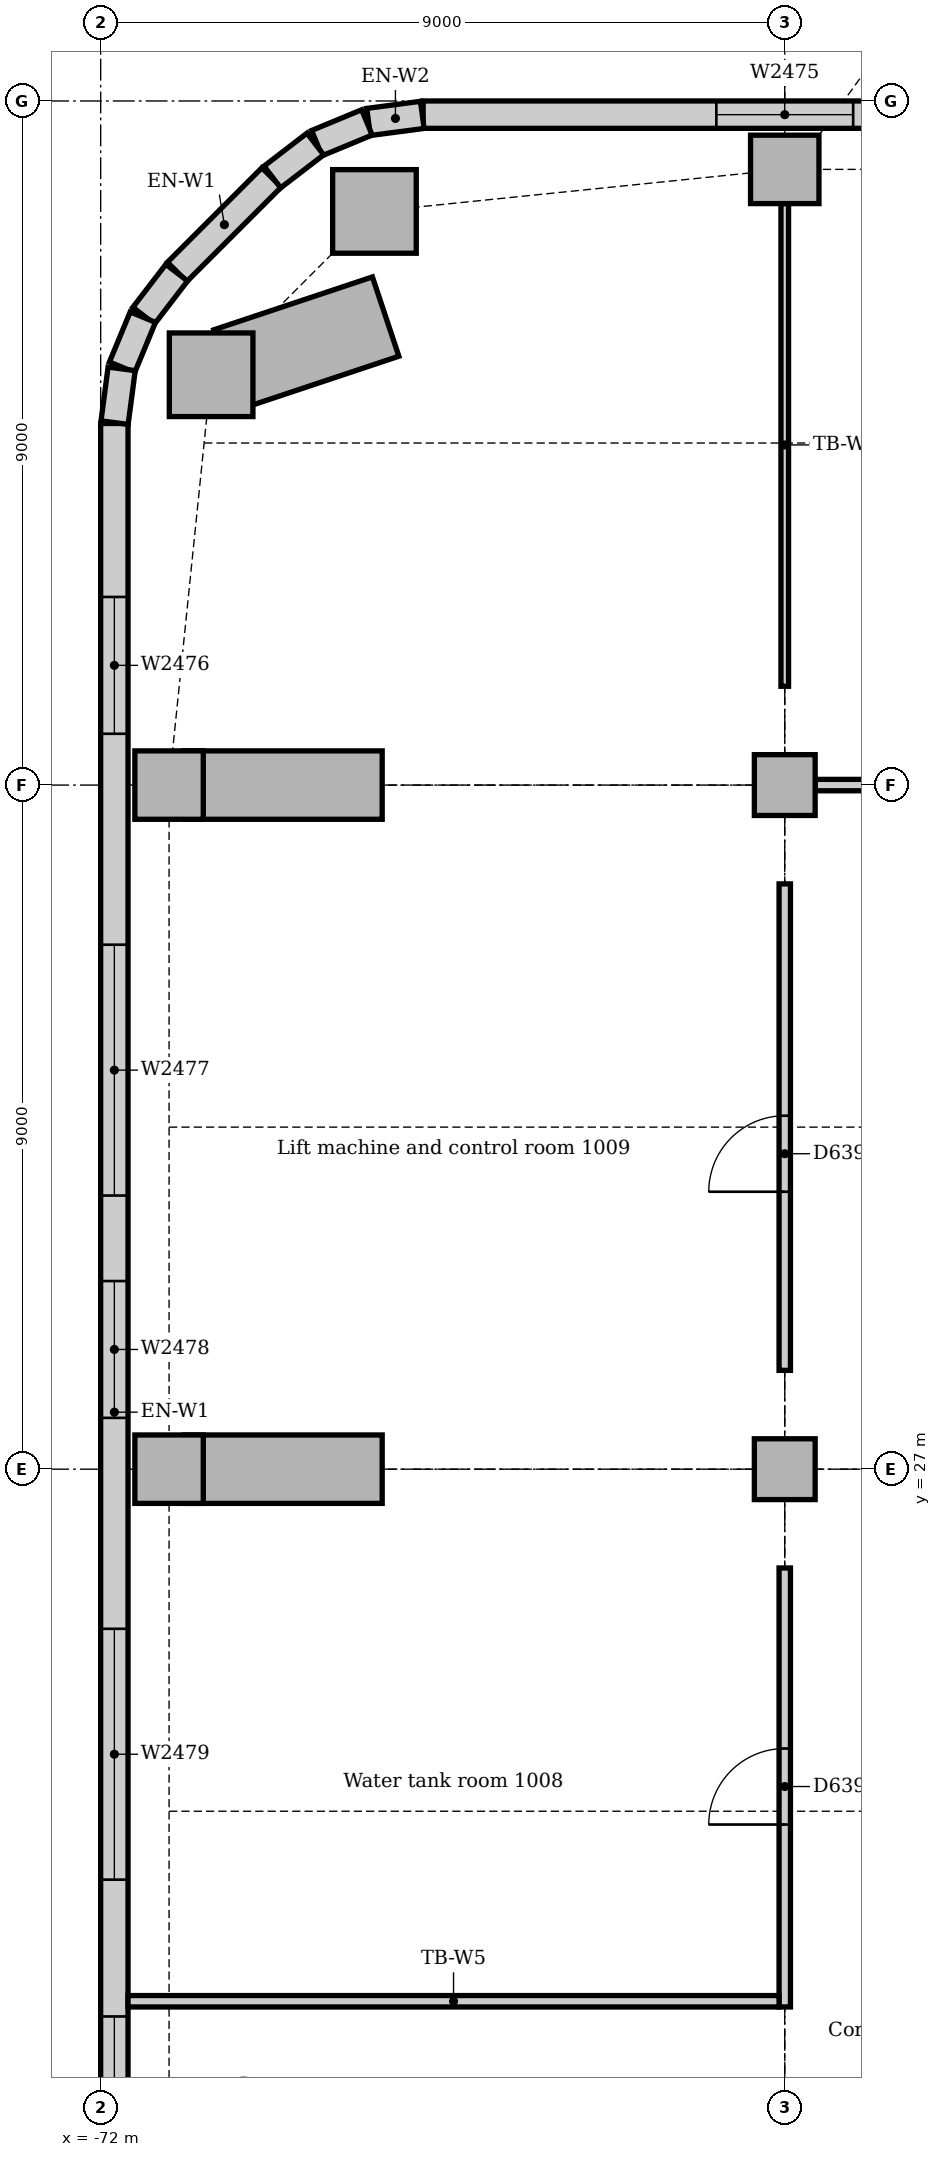
"""IFC4 building model, lengths in metres.
Left out: names, types, materials, properties, quantities, classifications, styles, units other than length and angle.
Written with IfcOpenShell. Run it as: python <this file> out.ifc"""

import sys

from ifc_helpers import new_model, si_unit, direction, frame, frame_2d, origin, origin_2d, place, context, subcontext, project, spatial, rectangle, extrude, element, fill, save


model = new_model("IFC4")
c1 = context("Model", 3, precision=1e-05, world=origin(), true_north=direction((0.0, 1.0)))
c2 = subcontext(c1, "Body", "Model", "MODEL_VIEW")
j1 = project(units=[si_unit("LENGTHUNIT", "METRE"), si_unit("PLANEANGLEUNIT", "RADIAN")], contexts=[c1])
p1 = place(None, origin())
s1 = spatial("IfcSite", under=j1, at=p1, CompositionType="ELEMENT")
p2 = place(p1, origin())
s2 = spatial("IfcBuilding", under=s1, at=p2, CompositionType="ELEMENT")
p3 = place(p2, frame((0.0, 0.0, 46.0)))
s3 = spatial("IfcBuildingStorey", under=s2, at=p3, CompositionType="ELEMENT", Elevation=46.0)
for number, where, z_axis, x_axis in (
    (1, (-68.398, 43.547, 0.0), (0.0, 0.0, 1.0), (1.0, 0.0, 0.0)),
    (2, (-70.547, 41.398, 0.0), (0.0, 0.0, 1.0), (1.0, 0.0, 0.0)),
):
    element("IfcColumn", number, at=place(p3, frame(where, z_axis=z_axis, x_axis=x_axis)), inside=s3, PredefinedType="COLUMN", context=c2, shape_type="SweptSolid", body=[
        extrude(rectangle(XDim=1.1, YDim=1.1, at=origin_2d()), origin(), (0.0, 0.0, 1.0), 4.85),
    ])
for number, where, z_axis, x_axis in (
    (3, (-63.0, 44.1, 0.0), (0.0, 0.0, 1.0), (1.0, 0.0, 0.0)),
    (4, (-71.1, 27.0, 0.0), (0.0, 0.0, 1.0), (1.0, 0.0, 0.0)),
    (5, (-71.1, 36.0, 0.0), (0.0, 0.0, 1.0), (1.0, 0.0, 0.0)),
):
    element("IfcColumn", number, at=place(p3, frame(where, z_axis=z_axis, x_axis=x_axis)), inside=s3, PredefinedType="COLUMN", context=c2, shape_type="SweptSolid", body=[
        extrude(rectangle(XDim=0.9, YDim=0.9, at=origin_2d()), origin(), (0.0, 0.0, 1.0), 4.85),
    ])
for number, where, z_axis, x_axis in (
    (6, (-63.0, 27.0, 0.0), (0.0, 0.0, 1.0), (1.0, 0.0, 0.0)),
    (7, (-63.0, 36.0, 0.0), (0.0, 0.0, 1.0), (1.0, 0.0, 0.0)),
):
    element("IfcColumn", number, at=place(p3, frame(where, z_axis=z_axis, x_axis=x_axis)), inside=s3, PredefinedType="COLUMN", context=c2, shape_type="SweptSolid", body=[
        extrude(rectangle(XDim=0.8, YDim=0.8, at=origin_2d()), origin(), (0.0, 0.0, 1.0), 4.85),
    ])
p4 = place(p3, frame((-31.243, 44.82, 0.0), z_axis=(0.0, 0.0, 1.0), x_axis=(-1.0, 0.0, 0.0)))
e8 = element("IfcWall", 8, at=p4, inside=s3, PredefinedType="STANDARD", context=c2, shape_type="SweptSolid", body=[
    extrude(rectangle(XDim=36.515, YDim=0.36, at=frame_2d((18.257, 0.0))), origin(), (0.0, 0.0, 1.0), 3.25),
])
p5 = place(p4, frame((3.857, 0.0, 1.2)))
e9 = element("IfcOpeningElement", 9, at=p5, cuts=e8, PredefinedType="OPENING", context=c2, shape_type="SweptSolid", body=[
    extrude(rectangle(XDim=1.8, YDim=1.2, at=frame_2d((0.9, 0.6))), frame((0.0, 0.19, 0.0), z_axis=(0.0, -1.0, 0.0), x_axis=(1.0, 0.0, 0.0)), (0.0, 0.0, 1.0), 0.38),
])
p6 = place(p4, frame((8.357, 0.0, 1.2)))
e10 = element("IfcOpeningElement", 10, at=p6, cuts=e8, PredefinedType="OPENING", context=c2, shape_type="SweptSolid", body=[
    extrude(rectangle(XDim=1.8, YDim=1.2, at=frame_2d((0.9, 0.6))), frame((0.0, 0.19, 0.0), z_axis=(0.0, -1.0, 0.0), x_axis=(1.0, 0.0, 0.0)), (0.0, 0.0, 1.0), 0.38),
])
p7 = place(p4, frame((12.857, 0.0, 1.2)))
e11 = element("IfcOpeningElement", 11, at=p7, cuts=e8, PredefinedType="OPENING", context=c2, shape_type="SweptSolid", body=[
    extrude(rectangle(XDim=1.8, YDim=1.2, at=frame_2d((0.9, 0.6))), frame((0.0, 0.19, 0.0), z_axis=(0.0, -1.0, 0.0), x_axis=(1.0, 0.0, 0.0)), (0.0, 0.0, 1.0), 0.38),
])
p8 = place(p4, frame((17.357, 0.0, 1.2)))
e12 = element("IfcOpeningElement", 12, at=p8, cuts=e8, PredefinedType="OPENING", context=c2, shape_type="SweptSolid", body=[
    extrude(rectangle(XDim=1.8, YDim=1.2, at=frame_2d((0.9, 0.6))), frame((0.0, 0.19, 0.0), z_axis=(0.0, -1.0, 0.0), x_axis=(1.0, 0.0, 0.0)), (0.0, 0.0, 1.0), 0.38),
])
p9 = place(p4, frame((21.857, 0.0, 1.2)))
e13 = element("IfcOpeningElement", 13, at=p9, cuts=e8, PredefinedType="OPENING", context=c2, shape_type="SweptSolid", body=[
    extrude(rectangle(XDim=1.8, YDim=1.2, at=frame_2d((0.9, 0.6))), frame((0.0, 0.19, 0.0), z_axis=(0.0, -1.0, 0.0), x_axis=(1.0, 0.0, 0.0)), (0.0, 0.0, 1.0), 0.38),
])
p10 = place(p4, frame((26.357, 0.0, 1.2)))
e14 = element("IfcOpeningElement", 14, at=p10, cuts=e8, PredefinedType="OPENING", context=c2, shape_type="SweptSolid", body=[
    extrude(rectangle(XDim=1.8, YDim=1.2, at=frame_2d((0.9, 0.6))), frame((0.0, 0.19, 0.0), z_axis=(0.0, -1.0, 0.0), x_axis=(1.0, 0.0, 0.0)), (0.0, 0.0, 1.0), 0.38),
])
p11 = place(p4, frame((30.857, 0.0, 1.2)))
e15 = element("IfcOpeningElement", 15, at=p11, cuts=e8, PredefinedType="OPENING", context=c2, shape_type="SweptSolid", body=[
    extrude(rectangle(XDim=1.8, YDim=1.2, at=frame_2d((0.9, 0.6))), frame((0.0, 0.19, 0.0), z_axis=(0.0, -1.0, 0.0), x_axis=(1.0, 0.0, 0.0)), (0.0, 0.0, 1.0), 0.38),
])
p12 = place(p3, frame((-69.751, 43.994, 0.0), z_axis=(0.0, 0.0, 1.0), x_axis=(-0.707106781187, -0.707106781187, 0.0)))
e16 = element("IfcWall", 16, at=p12, inside=s3, PredefinedType="STANDARD", context=c2, shape_type="SweptSolid", body=[
    extrude(rectangle(XDim=1.757, YDim=0.36, at=frame_2d((0.879, 0.0))), origin(), (0.0, 0.0, 1.0), 3.25),
])
p13 = place(p3, frame((-71.82, 40.757, 0.0), z_axis=(0.0, 0.0, 1.0), x_axis=(0.0, -1.0, 0.0)))
e17 = element("IfcWall", 17, at=p13, inside=s3, PredefinedType="STANDARD", context=c2, shape_type="SweptSolid", body=[
    extrude(rectangle(XDim=26.015, YDim=0.36, at=frame_2d((13.007, 0.0))), origin(), (0.0, 0.0, 1.0), 4.85),
])
p14 = place(p13, frame((2.282, 0.0, 1.2)))
e18 = element("IfcOpeningElement", 18, at=p14, cuts=e17, PredefinedType="OPENING", context=c2, shape_type="SweptSolid", body=[
    extrude(rectangle(XDim=1.8, YDim=1.2, at=frame_2d((0.9, 0.6))), frame((0.0, 0.19, 0.0), z_axis=(0.0, -1.0, 0.0), x_axis=(1.0, 0.0, 0.0)), (0.0, 0.0, 1.0), 0.38),
])
p15 = place(p13, frame((6.857, 0.0, 0.9)))
e19 = element("IfcOpeningElement", 19, at=p15, cuts=e17, PredefinedType="OPENING", context=c2, shape_type="SweptSolid", body=[
    extrude(rectangle(XDim=3.3, YDim=2.2, at=frame_2d((1.65, 1.1))), frame((0.0, 0.19, 0.0), z_axis=(0.0, -1.0, 0.0), x_axis=(1.0, 0.0, 0.0)), (0.0, 0.0, 1.0), 0.38),
])
p16 = place(p13, frame((11.282, 0.0, 1.2)))
e20 = element("IfcOpeningElement", 20, at=p16, cuts=e17, PredefinedType="OPENING", context=c2, shape_type="SweptSolid", body=[
    extrude(rectangle(XDim=1.8, YDim=1.2, at=frame_2d((0.9, 0.6))), frame((0.0, 0.19, 0.0), z_axis=(0.0, -1.0, 0.0), x_axis=(1.0, 0.0, 0.0)), (0.0, 0.0, 1.0), 0.38),
])
p17 = place(p13, frame((15.857, 0.0, 0.9)))
e21 = element("IfcOpeningElement", 21, at=p17, cuts=e17, PredefinedType="OPENING", context=c2, shape_type="SweptSolid", body=[
    extrude(rectangle(XDim=3.3, YDim=2.2, at=frame_2d((1.65, 1.1))), frame((0.0, 0.19, 0.0), z_axis=(0.0, -1.0, 0.0), x_axis=(1.0, 0.0, 0.0)), (0.0, 0.0, 1.0), 0.38),
])
p18 = place(p13, frame((20.957, 0.0, 0.9)))
e22 = element("IfcOpeningElement", 22, at=p18, cuts=e17, PredefinedType="OPENING", context=c2, shape_type="SweptSolid", body=[
    extrude(rectangle(XDim=3.3, YDim=2.2, at=frame_2d((1.65, 1.1))), frame((0.0, 0.19, 0.0), z_axis=(0.0, -1.0, 0.0), x_axis=(1.0, 0.0, 0.0)), (0.0, 0.0, 1.0), 0.38),
])
for number, where, z_axis, x_axis in (
    (23, (-67.769, 44.817, 0.0), (0.0, 0.0, 1.0), (-0.991, -0.131, 0.0)),
    (24, (-68.497, 44.718, 0.0), (0.0, 0.0, 1.0), (-0.924, -0.383, 0.0)),
):
    element("IfcWall", number, at=place(p3, frame(where, z_axis=z_axis, x_axis=x_axis)), inside=s3, PredefinedType="STANDARD", context=c2, shape_type="SweptSolid", body=[
        extrude(rectangle(XDim=0.713, YDim=0.36, at=frame_2d((0.356, 0.0))), origin(), (0.0, 0.0, 1.0), 3.25),
    ])
for number, where, z_axis, x_axis in (
    (25, (-69.175, 44.434, 0.0), (0.0, 0.0, 1.0), (-0.793, -0.609, 0.0)),
    (26, (-71.0, 42.741, 0.0), (0.0, 0.0, 1.0), (-0.609, -0.793, 0.0)),
):
    element("IfcWall", number, at=place(p3, frame(where, z_axis=z_axis, x_axis=x_axis)), inside=s3, PredefinedType="STANDARD", context=c2, shape_type="SweptSolid", body=[
        extrude(rectangle(XDim=0.713, YDim=0.36, at=frame_2d((0.357, 0.0))), origin(), (0.0, 0.0, 1.0), 3.25),
    ])
for number, where, z_axis, x_axis in (
    (27, (-71.445, 42.156, 0.0), (0.0, 0.0, 1.0), (-0.383, -0.924, 0.0)),
    (28, (-71.724, 41.476, 0.0), (0.0, 0.0, 1.0), (-0.131, -0.991, 0.0)),
):
    element("IfcWall", number, at=place(p3, frame(where, z_axis=z_axis, x_axis=x_axis)), inside=s3, PredefinedType="STANDARD", context=c2, shape_type="SweptSolid", body=[
        extrude(rectangle(XDim=0.713, YDim=0.36, at=frame_2d((0.356, 0.0))), origin(), (0.0, 0.0, 1.0), 3.25),
    ])
p19 = place(p3, frame((-62.6, 36.0, 0.0), z_axis=(0.0, 0.0, 1.0), x_axis=(1.0, 0.0, 0.0)))
e29 = element("IfcWall", 29, at=p19, inside=s3, PredefinedType="PARTITIONING", context=c2, shape_type="SweptSolid", body=[
    extrude(rectangle(XDim=8.2, YDim=0.15, at=frame_2d((4.1, 0.0))), origin(), (0.0, 0.0, 1.0), 4.158),
])
p20 = place(p19, frame((3.6, 0.0, 0.0)))
e30 = element("IfcOpeningElement", 30, at=p20, cuts=e29, PredefinedType="OPENING", context=c2, shape_type="SweptSolid", body=[
    extrude(rectangle(XDim=1.0, YDim=2.1, at=frame_2d((0.5, 1.05))), frame((0.0, 0.085, 0.0), z_axis=(0.0, -1.0, 0.0), x_axis=(1.0, 0.0, 0.0)), (0.0, 0.0, 1.0), 0.17),
])
p21 = place(p3, frame((-63.0, 19.925, 0.0), z_axis=(0.0, 0.0, 1.0), x_axis=(0.0, 1.0, 0.0)))
e31 = element("IfcWall", 31, at=p21, inside=s3, PredefinedType="PARTITIONING", context=c2, shape_type="SweptSolid", body=[
    extrude(rectangle(XDim=5.775, YDim=0.15, at=frame_2d((2.888, 0.0))), origin(), (0.0, 0.0, 1.0), 4.256),
])
p22 = place(p21, frame((2.4, 0.0, 0.0)))
e32 = element("IfcOpeningElement", 32, at=p22, cuts=e31, PredefinedType="OPENING", context=c2, shape_type="SweptSolid", body=[
    extrude(rectangle(XDim=1.0, YDim=2.1, at=frame_2d((0.5, 1.05))), frame((0.0, 0.085, 0.0), z_axis=(0.0, -1.0, 0.0), x_axis=(1.0, 0.0, 0.0)), (0.0, 0.0, 1.0), 0.17),
])
p23 = place(p3, frame((-63.0, 28.3, 0.0), z_axis=(0.0, 0.0, 1.0), x_axis=(0.0, 1.0, 0.0)))
e33 = element("IfcWall", 33, at=p23, inside=s3, PredefinedType="PARTITIONING", context=c2, shape_type="SweptSolid", body=[
    extrude(rectangle(XDim=6.4, YDim=0.15, at=frame_2d((3.2, 0.0))), origin(), (0.0, 0.0, 1.0), 4.25),
])
p24 = place(p23, frame((2.35, 0.0, 0.0)))
e34 = element("IfcOpeningElement", 34, at=p24, cuts=e33, PredefinedType="OPENING", context=c2, shape_type="SweptSolid", body=[
    extrude(rectangle(XDim=1.0, YDim=2.1, at=frame_2d((0.5, 1.05))), frame((0.0, 0.085, 0.0), z_axis=(0.0, -1.0, 0.0), x_axis=(1.0, 0.0, 0.0)), (0.0, 0.0, 1.0), 0.17),
])
p25 = place(p3, frame((-71.64, 20.0, 0.0), z_axis=(0.0, 0.0, 1.0), x_axis=(1.0, 0.0, 0.0)))
e35 = element("IfcWall", 35, at=p25, inside=s3, PredefinedType="PARTITIONING", context=c2, shape_type="SweptSolid", body=[
    extrude(rectangle(XDim=8.565, YDim=0.15, at=frame_2d((4.282, 0.0))), origin(), (0.0, 0.0, 1.0), 4.85),
])
p26 = place(p3, frame((-63.0, 37.3, 0.0), z_axis=(0.0, 0.0, 1.0), x_axis=(0.0, 1.0, 0.0)))
e36 = element("IfcWall", 36, at=p26, inside=s3, PredefinedType="PARTITIONING", context=c2, shape_type="SweptSolid", body=[
    extrude(rectangle(XDim=6.35, YDim=0.1, at=frame_2d((3.175, 0.0))), origin(), (0.0, 0.0, 1.0), 4.254),
])
p27 = place(p11, origin())
e37 = element("IfcWindow", 37, at=p27, inside=s3, PartitioningType="SINGLE_PANEL", PredefinedType="WINDOW", context=c2, shape_type="SweptSolid", body=[
    extrude(rectangle(XDim=1.8, YDim=1.2, at=frame_2d((0.9, 0.6))), frame((0.0, 0.13, 0.0), z_axis=(0.0, -1.0, 0.0), x_axis=(1.0, 0.0, 0.0)), (0.0, 0.0, 1.0), 0.06),
])
fill(e15, e37)
p28 = place(p14, origin())
e38 = element("IfcWindow", 38, at=p28, inside=s3, PartitioningType="SINGLE_PANEL", PredefinedType="WINDOW", context=c2, shape_type="SweptSolid", body=[
    extrude(rectangle(XDim=1.8, YDim=1.2, at=frame_2d((0.9, 0.6))), frame((0.0, 0.13, 0.0), z_axis=(0.0, -1.0, 0.0), x_axis=(1.0, 0.0, 0.0)), (0.0, 0.0, 1.0), 0.06),
])
fill(e18, e38)
p29 = place(p15, origin())
e39 = element("IfcWindow", 39, at=p29, inside=s3, PartitioningType="SINGLE_PANEL", PredefinedType="WINDOW", context=c2, shape_type="SweptSolid", body=[
    extrude(rectangle(XDim=3.3, YDim=2.2, at=frame_2d((1.65, 1.1))), frame((0.0, 0.13, 0.0), z_axis=(0.0, -1.0, 0.0), x_axis=(1.0, 0.0, 0.0)), (0.0, 0.0, 1.0), 0.06),
])
fill(e19, e39)
p30 = place(p16, origin())
e40 = element("IfcWindow", 40, at=p30, inside=s3, PartitioningType="SINGLE_PANEL", PredefinedType="WINDOW", context=c2, shape_type="SweptSolid", body=[
    extrude(rectangle(XDim=1.8, YDim=1.2, at=frame_2d((0.9, 0.6))), frame((0.0, 0.13, 0.0), z_axis=(0.0, -1.0, 0.0), x_axis=(1.0, 0.0, 0.0)), (0.0, 0.0, 1.0), 0.06),
])
fill(e20, e40)
p31 = place(p17, origin())
e41 = element("IfcWindow", 41, at=p31, inside=s3, PartitioningType="SINGLE_PANEL", PredefinedType="WINDOW", context=c2, shape_type="SweptSolid", body=[
    extrude(rectangle(XDim=3.3, YDim=2.2, at=frame_2d((1.65, 1.1))), frame((0.0, 0.13, 0.0), z_axis=(0.0, -1.0, 0.0), x_axis=(1.0, 0.0, 0.0)), (0.0, 0.0, 1.0), 0.06),
])
fill(e21, e41)
p32 = place(p18, origin())
e42 = element("IfcWindow", 42, at=p32, inside=s3, PartitioningType="SINGLE_PANEL", PredefinedType="WINDOW", context=c2, shape_type="SweptSolid", body=[
    extrude(rectangle(XDim=3.3, YDim=2.2, at=frame_2d((1.65, 1.1))), frame((0.0, 0.13, 0.0), z_axis=(0.0, -1.0, 0.0), x_axis=(1.0, 0.0, 0.0)), (0.0, 0.0, 1.0), 0.06),
])
fill(e22, e42)
p33 = place(p22, origin())
e43 = element("IfcDoor", 43, at=p33, inside=s3, OperationType="SINGLE_SWING_LEFT", PredefinedType="DOOR", context=c2, shape_type="SweptSolid", body=[
    extrude(rectangle(XDim=1.0, YDim=2.1, at=frame_2d((0.5, 1.05))), frame((0.0, 0.025, 0.0), z_axis=(0.0, -1.0, 0.0), x_axis=(1.0, 0.0, 0.0)), (0.0, 0.0, 1.0), 0.05),
])
fill(e32, e43)
p34 = place(p24, origin())
e44 = element("IfcDoor", 44, at=p34, inside=s3, OperationType="SINGLE_SWING_LEFT", PredefinedType="DOOR", context=c2, shape_type="SweptSolid", body=[
    extrude(rectangle(XDim=1.0, YDim=2.1, at=frame_2d((0.5, 1.05))), frame((0.0, 0.025, 0.0), z_axis=(0.0, -1.0, 0.0), x_axis=(1.0, 0.0, 0.0)), (0.0, 0.0, 1.0), 0.05),
])
fill(e34, e44)
save(model, sys.argv[1])
